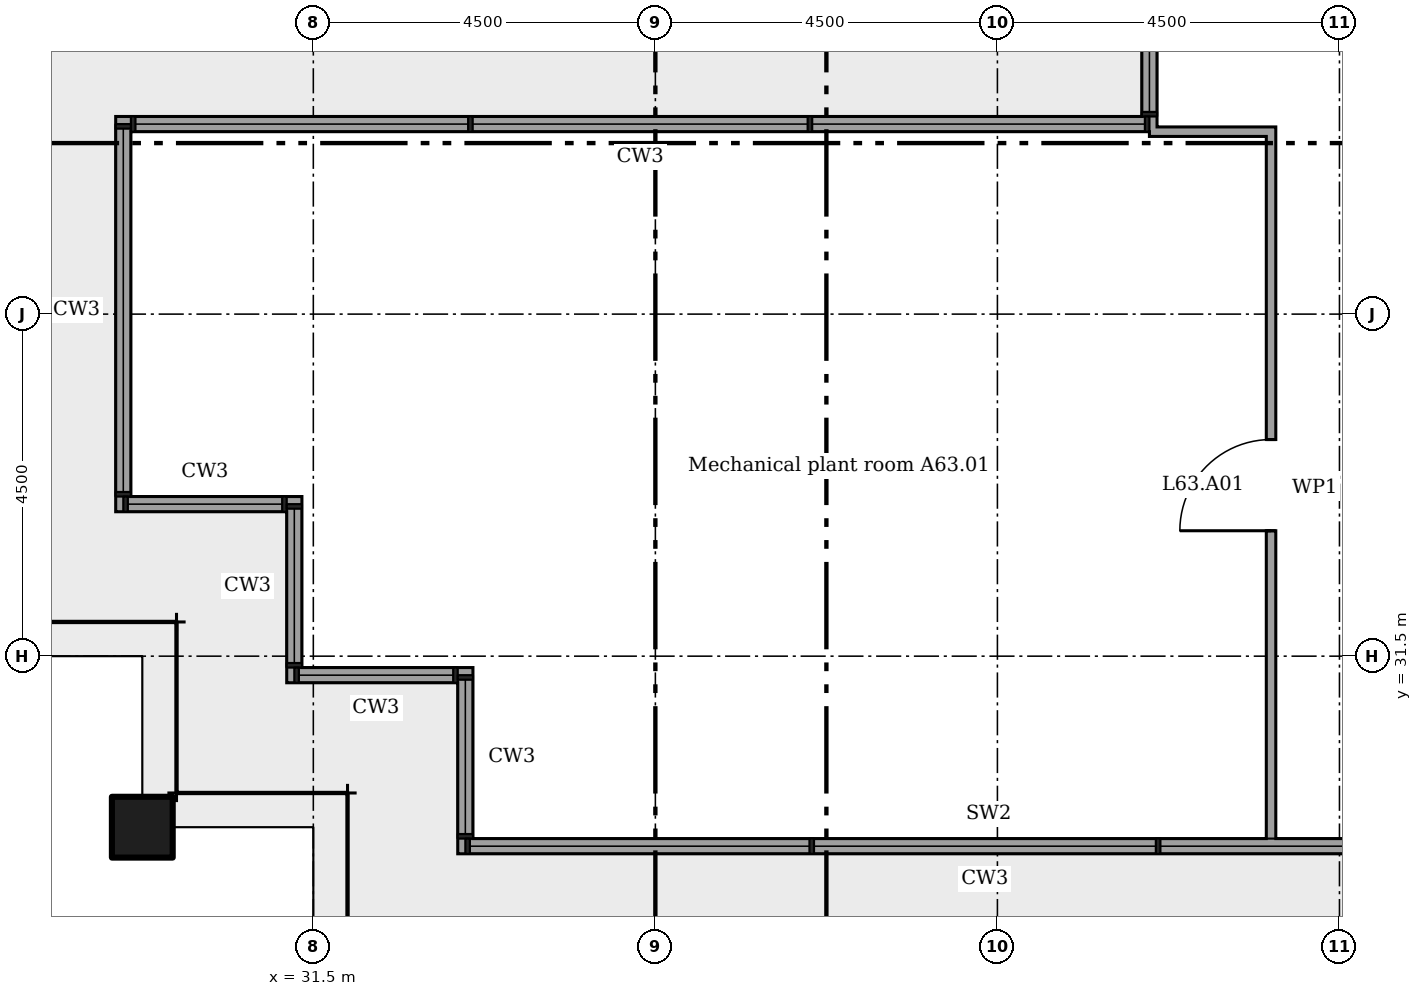
"""IFC4 building model, lengths in metres.
Left out: names, types, materials, properties, quantities, classifications, styles, units other than length and angle.
Written with IfcOpenShell. Run it as: python <this file> out.ifc"""

import sys

from ifc_helpers import new_model, si_unit, direction, frame, frame_2d, origin, origin_2d, place, context, subcontext, project, spatial, rectangle, extrude, element, fill, save


model = new_model("IFC4")
c1 = context("Model", 3, precision=1e-05, world=origin(), true_north=direction((0.0, 1.0)))
c2 = subcontext(c1, "Body", "Model", "MODEL_VIEW")
j1 = project(units=[si_unit("LENGTHUNIT", "METRE"), si_unit("PLANEANGLEUNIT", "RADIAN")], contexts=[c1])
p1 = place(None, origin())
s1 = spatial("IfcSite", under=j1, at=p1, CompositionType="ELEMENT")
p2 = place(p1, origin())
s2 = spatial("IfcBuilding", under=s1, at=p2, CompositionType="ELEMENT")
p3 = place(p2, frame((0.0, 0.0, 246.0)))
s3 = spatial("IfcBuildingStorey", under=s2, at=p3, CompositionType="ELEMENT", Elevation=246.0)
p4 = place(p3, frame((29.25, 29.25, 0.0)))
e1 = element("IfcColumn", 1, at=p4, inside=s3, PredefinedType="COLUMN", context=c2, shape_type="SweptSolid", body=[
    extrude(rectangle(XDim=0.8, YDim=0.8, at=origin_2d()), origin(), (0.0, 0.0, 1.0), 5.0),
])
p5 = place(p3, frame((42.5, 40.5, 0.0), z_axis=(0.0, 0.0, 1.0), x_axis=(0.0, -1.0, 0.0)))
e2 = element("IfcWall", 2, at=p5, inside=s3, PredefinedType="ELEMENTEDWALL", context=c2, shape_type="SweptSolid", body=[
    extrude(rectangle(XDim=2.1, YDim=0.2, at=frame_2d((1.05, 0.0))), origin(), (0.0, 0.0, 1.0), 1.8),
])
p6 = place(p3, frame((42.4, 38.5, 0.0), z_axis=(0.0, 0.0, 1.0), x_axis=(-1.0, 0.0, 0.0)))
e3 = element("IfcWall", 3, at=p6, inside=s3, PredefinedType="ELEMENTEDWALL", context=c2, shape_type="SweptSolid", body=[
    extrude(rectangle(XDim=13.5, YDim=0.2, at=frame_2d((6.75, 0.0))), origin(), (0.0, 0.0, 1.0), 1.8),
])
p7 = place(p3, frame((29.0, 38.4, 0.0), z_axis=(0.0, 0.0, 1.0), x_axis=(0.0, -1.0, 0.0)))
e4 = element("IfcWall", 4, at=p7, inside=s3, PredefinedType="ELEMENTEDWALL", context=c2, shape_type="SweptSolid", body=[
    extrude(rectangle(XDim=5.0, YDim=0.2, at=frame_2d((2.5, 0.0))), origin(), (0.0, 0.0, 1.0), 1.8),
])
p8 = place(p3, frame((29.1, 33.5, 0.0)))
e5 = element("IfcWall", 5, at=p8, inside=s3, PredefinedType="ELEMENTEDWALL", context=c2, shape_type="SweptSolid", body=[
    extrude(rectangle(XDim=2.25, YDim=0.2, at=frame_2d((1.125, 0.0))), origin(), (0.0, 0.0, 1.0), 1.8),
])
p9 = place(p3, frame((31.25, 33.4, 0.0), z_axis=(0.0, 0.0, 1.0), x_axis=(0.0, -1.0, 0.0)))
e6 = element("IfcWall", 6, at=p9, inside=s3, PredefinedType="ELEMENTEDWALL", context=c2, shape_type="SweptSolid", body=[
    extrude(rectangle(XDim=2.25, YDim=0.2, at=frame_2d((1.125, 0.0))), origin(), (0.0, 0.0, 1.0), 1.8),
])
p10 = place(p3, frame((31.35, 31.25, 0.0)))
e7 = element("IfcWall", 7, at=p10, inside=s3, PredefinedType="ELEMENTEDWALL", context=c2, shape_type="SweptSolid", body=[
    extrude(rectangle(XDim=2.25, YDim=0.2, at=frame_2d((1.125, 0.0))), origin(), (0.0, 0.0, 1.0), 1.8),
])
p11 = place(p3, frame((33.5, 31.15, 0.0), z_axis=(0.0, 0.0, 1.0), x_axis=(0.0, -1.0, 0.0)))
e8 = element("IfcWall", 8, at=p11, inside=s3, PredefinedType="ELEMENTEDWALL", context=c2, shape_type="SweptSolid", body=[
    extrude(rectangle(XDim=2.25, YDim=0.2, at=frame_2d((1.125, 0.0))), origin(), (0.0, 0.0, 1.0), 1.8),
])
p12 = place(p3, frame((33.6, 29.0, 0.0)))
e9 = element("IfcWall", 9, at=p12, inside=s3, PredefinedType="ELEMENTEDWALL", context=c2, shape_type="SweptSolid", body=[
    extrude(rectangle(XDim=13.571, YDim=0.2, at=frame_2d((6.786, 0.0))), origin(), (0.0, 0.0, 1.0), 1.8),
])
p13 = place(p3, frame((42.5, 38.4, 0.0)))
e10 = element("IfcWall", 10, at=p13, inside=s3, PredefinedType="PARTITIONING", context=c2, shape_type="SweptSolid", body=[
    extrude(rectangle(XDim=1.663, YDim=0.125, at=frame_2d((0.831, 0.0))), origin(), (0.0, 0.0, 1.0), 4.825),
])
p14 = place(p3, frame((44.1, 29.1, 0.0), z_axis=(0.0, 0.0, 1.0), x_axis=(0.0, 1.0, 0.0)))
e11 = element("IfcWall", 11, at=p14, inside=s3, PredefinedType="PARTITIONING", context=c2, shape_type="SweptSolid", body=[
    extrude(rectangle(XDim=9.237, YDim=0.125, at=frame_2d((4.619, 0.0))), origin(), (0.0, 0.0, 1.0), 4.825),
])
p15 = place(p14, frame((4.05, 0.0, 0.0)))
e12 = element("IfcOpeningElement", 12, at=p15, cuts=e11, PredefinedType="OPENING", context=c2, shape_type="SweptSolid", body=[
    extrude(rectangle(XDim=1.2, YDim=2.1, at=frame_2d((0.6, 1.05))), frame((0.0, 0.073, 0.0), z_axis=(0.0, -1.0, 0.0), x_axis=(1.0, 0.0, 0.0)), (0.0, 0.0, 1.0), 0.145),
])
p16 = place(p15, origin())
e13 = element("IfcDoor", 13, at=p16, inside=s3, OperationType="SINGLE_SWING_RIGHT", PredefinedType="DOOR", context=c2, shape_type="SweptSolid", body=[
    extrude(rectangle(XDim=1.2, YDim=2.1, at=frame_2d((0.6, 1.05))), frame((0.0, 0.025, 0.0), z_axis=(0.0, -1.0, 0.0), x_axis=(1.0, 0.0, 0.0)), (0.0, 0.0, 1.0), 0.05),
])
fill(e12, e13)
save(model, sys.argv[1])
